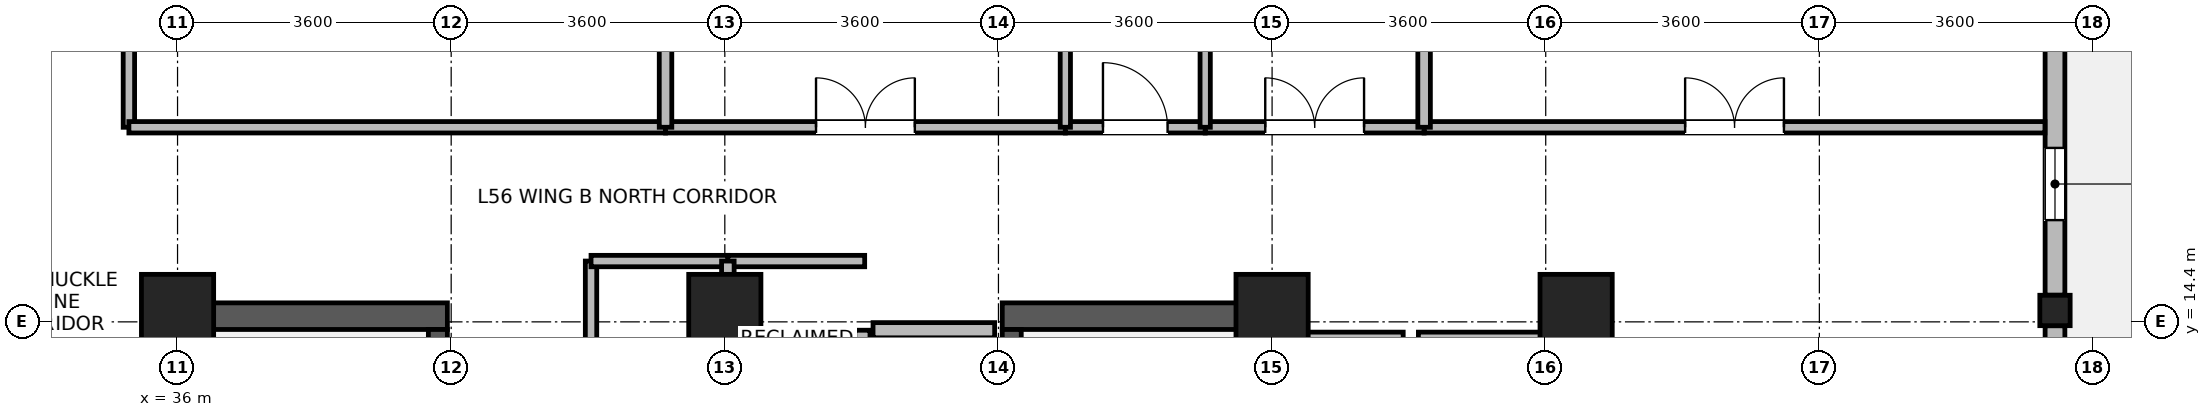
"""IFC4 building model, lengths in metres.
Left out: names, types, materials, properties, quantities, classifications, styles, units other than length and angle.
Written with IfcOpenShell. Run it as: python <this file> out.ifc"""

import sys

from ifc_helpers import new_model, si_unit, direction, frame, frame_2d, origin, origin_2d, place, context, subcontext, project, spatial, rectangle, i_section, extrude, source, transform, mapped, element, fill, save


model = new_model("IFC4")
c1 = context("Model", 3, precision=1e-05, world=origin(), true_north=direction((0.0, 1.0)))
c2 = subcontext(c1, "Body", "Model", "MODEL_VIEW")
j1 = project(units=[si_unit("LENGTHUNIT", "METRE"), si_unit("PLANEANGLEUNIT", "RADIAN")], contexts=[c1])
p1 = place(None, origin())
s1 = spatial("IfcSite", under=j1, at=p1, CompositionType="ELEMENT")
p2 = place(p1, origin())
s2 = spatial("IfcBuilding", under=s1, at=p2, CompositionType="ELEMENT")
p3 = place(p2, frame((0.0, 0.0, 220.3)))
s3 = spatial("IfcBuildingStorey", under=s2, at=p3, CompositionType="ELEMENT", Elevation=220.3)
for number, where, z_axis, x_axis in (
    (1, (36.175, 6.95, 0.0), (0.0, 0.0, 1.0), (0.0, 1.0, 0.0)),
    (2, (50.225, 6.95, 0.0), (0.0, 0.0, 1.0), (0.0, 1.0, 0.0)),
):
    element("IfcWall", number, at=place(p3, frame(where, z_axis=z_axis, x_axis=x_axis)), inside=s3, PredefinedType="SHEAR", context=c2, shape_type="SweptSolid", body=[
        extrude(rectangle(XDim=7.7, YDim=0.35, at=frame_2d((3.85, 0.0))), origin(), (0.0, 0.0, 1.0), 3.47),
    ])
for number, where, z_axis, x_axis in (
    (3, (36.35, 14.475, 0.0), (0.0, 0.0, 1.0), (1.0, 0.0, 0.0)),
    (4, (46.85, 14.475, 0.0), (0.0, 0.0, 1.0), (1.0, 0.0, 0.0)),
):
    element("IfcWall", number, at=place(p3, frame(where, z_axis=z_axis, x_axis=x_axis)), inside=s3, PredefinedType="SHEAR", context=c2, shape_type="SweptSolid", body=[
        extrude(rectangle(XDim=3.2, YDim=0.35, at=frame_2d((1.6, 0.0))), origin(), (0.0, 0.0, 1.0), 3.47),
    ])
p4 = place(p3, frame((39.425, 7.3, 0.0), z_axis=(0.0, 0.0, 1.0), x_axis=(0.0, 1.0, 0.0)))
e5 = element("IfcWall", 5, at=p4, inside=s3, PredefinedType="SHEAR", context=c2, shape_type="SweptSolid", body=[
    extrude(rectangle(XDim=7.0, YDim=0.25, at=frame_2d((3.5, 0.0))), origin(), (0.0, 0.0, 1.0), 3.47),
])
p5 = place(p4, frame((0.15, 0.0, 0.0)))
e6 = element("IfcOpeningElement", 6, at=p5, cuts=e5, PredefinedType="OPENING", context=c2, shape_type="SweptSolid", body=[
    extrude(rectangle(XDim=1.1, YDim=2.08, at=frame_2d((0.55, 1.04))), frame((0.0, 0.135, 0.0), z_axis=(0.0, -1.0, 0.0), x_axis=(1.0, 0.0, 0.0)), (0.0, 0.0, 1.0), 0.27),
])
p6 = place(p3, frame((46.975, 7.3, 0.0), z_axis=(0.0, 0.0, 1.0), x_axis=(0.0, 1.0, 0.0)))
e7 = element("IfcWall", 7, at=p6, inside=s3, PredefinedType="SHEAR", context=c2, shape_type="SweptSolid", body=[
    extrude(rectangle(XDim=7.0, YDim=0.25, at=frame_2d((3.5, 0.0))), origin(), (0.0, 0.0, 1.0), 3.47),
])
p7 = place(p6, frame((0.15, 0.0, 0.0)))
e8 = element("IfcOpeningElement", 8, at=p7, cuts=e7, PredefinedType="OPENING", context=c2, shape_type="SweptSolid", body=[
    extrude(rectangle(XDim=1.1, YDim=2.08, at=frame_2d((0.55, 1.04))), frame((0.0, 0.135, 0.0), z_axis=(0.0, -1.0, 0.0), x_axis=(1.0, 0.0, 0.0)), (0.0, 0.0, 1.0), 0.27),
])
m1 = source(origin(), c2, "Body", "SweptSolid", [
    extrude(rectangle(XDim=0.95, YDim=0.95, at=origin_2d()), origin(), (0.0, 0.0, 1.0), 3.7),
])
for number, where, z_axis, x_axis in (
    (9, (36.0, 14.55, 0.0), (0.0, 0.0, 1.0), (1.0, 0.0, 0.0)),
    (10, (43.2, 14.55, 0.0), (0.0, 0.0, 1.0), (1.0, 0.0, 0.0)),
    (11, (50.4, 14.55, 0.0), (0.0, 0.0, 1.0), (1.0, 0.0, 0.0)),
    (12, (54.4, 14.55, 0.0), (0.0, 0.0, 1.0), (1.0, 0.0, 0.0)),
):
    element("IfcColumn", number, at=place(p3, frame(where, z_axis=z_axis, x_axis=x_axis)), inside=s3, PredefinedType="COLUMN", context=c2, shape_type="MappedRepresentation", body=[
        mapped(m1, transform((0.0, 0.0, 0.0), x_axis=(1.0, 0.0, 0.0), y_axis=(0.0, 1.0, 0.0), z_axis=(0.0, 0.0, 1.0), scale=1.0)),
    ])
m2 = source(origin(), c2, "Body", "SweptSolid", [
    extrude(i_section(OverallWidth=0.399, OverallDepth=0.4, WebThickness=0.017, FlangeThickness=0.023, FilletRadius=0.015, at=origin_2d()), origin(), (0.0, 0.0, 1.0), 3.7),
])
p8 = place(p3, frame((60.7, 14.55, 0.0), z_axis=(0.0, 0.0, 1.0), x_axis=(1.0, 0.0, 0.0)))
e13 = element("IfcColumn", 13, at=p8, inside=s3, PredefinedType="COLUMN", context=c2, shape_type="MappedRepresentation", body=[
    mapped(m2, transform((0.0, 0.0, 0.0), x_axis=(1.0, 0.0, 0.0), y_axis=(0.0, 1.0, 0.0), z_axis=(0.0, 0.0, 1.0), scale=1.0)),
])
p9 = place(p3, frame((60.7, 14.349, 0.0), z_axis=(0.0, 0.0, 1.0), x_axis=(0.0, -1.0, 0.0)))
e14 = element("IfcWall", 14, at=p9, inside=s3, PredefinedType="STANDARD", context=c2, shape_type="SweptSolid", body=[
    extrude(rectangle(XDim=7.098, YDim=0.26, at=frame_2d((3.549, 0.0))), origin(), (0.0, 0.0, 1.0), 3.05),
])
p10 = place(p9, frame((2.799, 0.0, 0.0)))
e15 = element("IfcOpeningElement", 15, at=p10, cuts=e14, PredefinedType="OPENING", context=c2, shape_type="SweptSolid", body=[
    extrude(rectangle(XDim=1.5, YDim=2.15, at=frame_2d((0.75, 1.075))), frame((0.0, 0.14, 0.0), z_axis=(0.0, -1.0, 0.0), x_axis=(1.0, 0.0, 0.0)), (0.0, 0.0, 1.0), 0.28),
])
p11 = place(p3, frame((60.7, 21.399, 0.0), z_axis=(0.0, 0.0, 1.0), x_axis=(0.0, -1.0, 0.0)))
e16 = element("IfcWall", 16, at=p11, inside=s3, PredefinedType="STANDARD", context=c2, shape_type="SweptSolid", body=[
    extrude(rectangle(XDim=6.648, YDim=0.26, at=frame_2d((3.324, 0.0))), origin(), (0.0, 0.0, 1.0), 3.05),
])
p12 = place(p11, frame((0.762, 0.0, 0.85)))
e17 = element("IfcOpeningElement", 17, at=p12, cuts=e16, PredefinedType="OPENING", context=c2, shape_type="SweptSolid", body=[
    extrude(rectangle(XDim=1.8, YDim=1.85, at=frame_2d((0.9, 0.925))), frame((0.0, 0.14, 0.0), z_axis=(0.0, -1.0, 0.0), x_axis=(1.0, 0.0, 0.0)), (0.0, 0.0, 1.0), 0.28),
])
p13 = place(p11, frame((4.71, 0.0, 0.85)))
e18 = element("IfcOpeningElement", 18, at=p13, cuts=e16, PredefinedType="OPENING", context=c2, shape_type="SweptSolid", body=[
    extrude(rectangle(XDim=0.95, YDim=1.75, at=frame_2d((0.475, 0.875))), frame((0.0, 0.14, 0.0), z_axis=(0.0, -1.0, 0.0), x_axis=(1.0, 0.0, 0.0)), (0.0, 0.0, 1.0), 0.28),
])
p14 = place(p3, frame((50.475, 14.165, 0.0), z_axis=(0.0, 0.0, 1.0), x_axis=(1.0, 0.0, 0.0)))
e19 = element("IfcWall", 19, at=p14, inside=s3, PredefinedType="PARTITIONING", context=c2, shape_type="SweptSolid", body=[
    extrude(rectangle(XDim=1.65, YDim=0.2, at=frame_2d((0.825, 0.0))), origin(), (0.0, 0.0, 1.0), 3.45),
])
p15 = place(p3, frame((52.325, 14.165, 0.0), z_axis=(0.0, 0.0, 1.0), x_axis=(1.0, 0.0, 0.0)))
e20 = element("IfcWall", 20, at=p15, inside=s3, PredefinedType="PARTITIONING", context=c2, shape_type="SweptSolid", body=[
    extrude(rectangle(XDim=1.65, YDim=0.2, at=frame_2d((0.825, 0.0))), origin(), (0.0, 0.0, 1.0), 3.45),
])
p16 = place(p3, frame((45.15, 14.29, 0.0), z_axis=(0.0, 0.0, 1.0), x_axis=(1.0, 0.0, 0.0)))
e21 = element("IfcWall", 21, at=p16, inside=s3, PredefinedType="PARTITIONING", context=c2, shape_type="SweptSolid", body=[
    extrude(rectangle(XDim=1.6, YDim=0.2, at=frame_2d((0.8, 0.0))), origin(), (0.0, 0.0, 1.0), 2.55),
])
p17 = place(p3, frame((45.01, 11.61, 0.0), z_axis=(0.0, 0.0, 1.0), x_axis=(0.0, 1.0, 0.0)))
e22 = element("IfcWall", 22, at=p17, inside=s3, PredefinedType="PARTITIONING", context=c2, shape_type="SweptSolid", body=[
    extrude(rectangle(XDim=2.68, YDim=0.2, at=frame_2d((1.34, 0.0))), origin(), (0.0, 0.0, 1.0), 3.45),
])
p18 = place(p3, frame((35.36, 16.96, 0.0), z_axis=(0.0, 0.0, 1.0), x_axis=(0.0, 1.0, 0.0)))
e23 = element("IfcWall", 23, at=p18, inside=s3, PredefinedType="PARTITIONING", context=c2, shape_type="SweptSolid", body=[
    extrude(rectangle(XDim=9.8, YDim=0.15, at=frame_2d((4.9, 0.0))), origin(), (0.0, 0.0, 1.0), 3.45),
])
p19 = place(p18, frame((2.486, 0.0, 0.0)))
e24 = element("IfcOpeningElement", 24, at=p19, cuts=e23, PredefinedType="OPENING", context=c2, shape_type="SweptSolid", body=[
    extrude(rectangle(XDim=1.3, YDim=2.12, at=frame_2d((0.65, 1.06))), frame((0.0, 0.085, 0.0), z_axis=(0.0, -1.0, 0.0), x_axis=(1.0, 0.0, 0.0)), (0.0, 0.0, 1.0), 0.17),
])
p20 = place(p3, frame((52.4, 16.96, 0.0), z_axis=(0.0, 0.0, 1.0), x_axis=(1.0, 0.0, 0.0)))
e25 = element("IfcWall", 25, at=p20, inside=s3, PredefinedType="PARTITIONING", context=c2, shape_type="SweptSolid", body=[
    extrude(rectangle(XDim=8.168, YDim=0.15, at=frame_2d((4.084, 0.0))), origin(), (0.0, 0.0, 1.0), 3.45),
])
p21 = place(p20, frame((3.434, 0.0, 0.0)))
e26 = element("IfcOpeningElement", 26, at=p21, cuts=e25, PredefinedType="OPENING", context=c2, shape_type="SweptSolid", body=[
    extrude(rectangle(XDim=1.3, YDim=2.12, at=frame_2d((0.65, 1.06))), frame((0.0, 0.085, 0.0), z_axis=(0.0, -1.0, 0.0), x_axis=(1.0, 0.0, 0.0)), (0.0, 0.0, 1.0), 0.17),
])
p22 = place(p3, frame((35.36, 16.96, 0.0), z_axis=(0.0, 0.0, 1.0), x_axis=(1.0, 0.0, 0.0)))
e27 = element("IfcWall", 27, at=p22, inside=s3, PredefinedType="PARTITIONING", context=c2, shape_type="SweptSolid", body=[
    extrude(rectangle(XDim=7.06, YDim=0.15, at=frame_2d((3.53, 0.0))), origin(), (0.0, 0.0, 1.0), 3.45),
])
p23 = place(p3, frame((42.42, 16.96, 0.0), z_axis=(0.0, 0.0, 1.0), x_axis=(1.0, 0.0, 0.0)))
e28 = element("IfcWall", 28, at=p23, inside=s3, PredefinedType="PARTITIONING", context=c2, shape_type="SweptSolid", body=[
    extrude(rectangle(XDim=5.26, YDim=0.15, at=frame_2d((2.63, 0.0))), origin(), (0.0, 0.0, 1.0), 3.45),
])
p24 = place(p23, frame((1.98, 0.0, 0.0)))
e29 = element("IfcOpeningElement", 29, at=p24, cuts=e28, PredefinedType="OPENING", context=c2, shape_type="SweptSolid", body=[
    extrude(rectangle(XDim=1.3, YDim=2.12, at=frame_2d((0.65, 1.06))), frame((0.0, 0.085, 0.0), z_axis=(0.0, -1.0, 0.0), x_axis=(1.0, 0.0, 0.0)), (0.0, 0.0, 1.0), 0.17),
])
p25 = place(p3, frame((41.44, 11.64, 0.0), z_axis=(0.0, 0.0, 1.0), x_axis=(0.0, 1.0, 0.0)))
e30 = element("IfcWall", 30, at=p25, inside=s3, PredefinedType="PARTITIONING", context=c2, shape_type="SweptSolid", body=[
    extrude(rectangle(XDim=3.56, YDim=0.15, at=frame_2d((1.78, 0.0))), origin(), (0.0, 0.0, 1.0), 3.45),
])
p26 = place(p25, frame((1.13, 0.0, 0.0)))
e31 = element("IfcOpeningElement", 31, at=p26, cuts=e30, PredefinedType="OPENING", context=c2, shape_type="SweptSolid", body=[
    extrude(rectangle(XDim=1.3, YDim=2.12, at=frame_2d((0.65, 1.06))), frame((0.0, 0.085, 0.0), z_axis=(0.0, -1.0, 0.0), x_axis=(1.0, 0.0, 0.0)), (0.0, 0.0, 1.0), 0.17),
])
p27 = place(p3, frame((49.52, 16.96, 0.0), z_axis=(0.0, 0.0, 1.0), x_axis=(1.0, 0.0, 0.0)))
e32 = element("IfcWall", 32, at=p27, inside=s3, PredefinedType="PARTITIONING", context=c2, shape_type="SweptSolid", body=[
    extrude(rectangle(XDim=2.88, YDim=0.15, at=frame_2d((1.44, 0.0))), origin(), (0.0, 0.0, 1.0), 3.45),
])
p28 = place(p27, frame((0.79, 0.0, 0.0)))
e33 = element("IfcOpeningElement", 33, at=p28, cuts=e32, PredefinedType="OPENING", context=c2, shape_type="SweptSolid", body=[
    extrude(rectangle(XDim=1.3, YDim=2.12, at=frame_2d((0.65, 1.06))), frame((0.0, 0.085, 0.0), z_axis=(0.0, -1.0, 0.0), x_axis=(1.0, 0.0, 0.0)), (0.0, 0.0, 1.0), 0.17),
])
p29 = place(p3, frame((47.68, 16.96, 0.0), z_axis=(0.0, 0.0, 1.0), x_axis=(1.0, 0.0, 0.0)))
e34 = element("IfcWall", 34, at=p29, inside=s3, PredefinedType="PARTITIONING", context=c2, shape_type="SweptSolid", body=[
    extrude(rectangle(XDim=1.84, YDim=0.15, at=frame_2d((0.92, 0.0))), origin(), (0.0, 0.0, 1.0), 3.45),
])
p30 = place(p29, frame((0.495, 0.0, 0.0)))
e35 = element("IfcOpeningElement", 35, at=p30, cuts=e34, PredefinedType="OPENING", context=c2, shape_type="SweptSolid", body=[
    extrude(rectangle(XDim=0.85, YDim=2.04, at=frame_2d((0.425, 1.02))), frame((0.0, 0.085, 0.0), z_axis=(0.0, -1.0, 0.0), x_axis=(1.0, 0.0, 0.0)), (0.0, 0.0, 1.0), 0.17),
])
for number, where, z_axis, x_axis in (
    (36, (41.44, 15.2, 0.0), (0.0, 0.0, 1.0), (1.0, 0.0, 0.0)),
    (37, (43.24, 15.2, 0.0), (0.0, 0.0, 1.0), (1.0, 0.0, 0.0)),
):
    element("IfcWall", number, at=place(p3, frame(where, z_axis=z_axis, x_axis=x_axis)), inside=s3, PredefinedType="PARTITIONING", context=c2, shape_type="SweptSolid", body=[
        extrude(rectangle(XDim=1.8, YDim=0.15, at=frame_2d((0.9, 0.0))), origin(), (0.0, 0.0, 1.0), 3.45),
    ])
p31 = place(p3, frame((42.42, 16.96, 0.0), z_axis=(0.0, 0.0, 1.0), x_axis=(0.0, 1.0, 0.0)))
e38 = element("IfcWall", 38, at=p31, inside=s3, PredefinedType="PARTITIONING", context=c2, shape_type="SweptSolid", body=[
    extrude(rectangle(XDim=9.8, YDim=0.165, at=frame_2d((4.9, 0.0))), origin(), (0.0, 0.0, 1.0), 3.45),
])
for number, where, z_axis, x_axis in (
    (39, (47.68, 16.96, 0.0), (0.0, 0.0, 1.0), (0.0, 1.0, 0.0)),
    (40, (49.52, 16.96, 0.0), (0.0, 0.0, 1.0), (0.0, 1.0, 0.0)),
):
    element("IfcWall", number, at=place(p3, frame(where, z_axis=z_axis, x_axis=x_axis)), inside=s3, PredefinedType="PARTITIONING", context=c2, shape_type="SweptSolid", body=[
        extrude(rectangle(XDim=9.8, YDim=0.135, at=frame_2d((4.9, 0.0))), origin(), (0.0, 0.0, 1.0), 3.45),
    ])
p32 = place(p3, frame((52.4, 16.96, 0.0), z_axis=(0.0, 0.0, 1.0), x_axis=(0.0, 1.0, 0.0)))
e41 = element("IfcWall", 41, at=p32, inside=s3, PredefinedType="PARTITIONING", context=c2, shape_type="SweptSolid", body=[
    extrude(rectangle(XDim=9.8, YDim=0.165, at=frame_2d((4.9, 0.0))), origin(), (0.0, 0.0, 1.0), 3.45),
])
p33 = place(p3, frame((43.24, 11.64, 0.0), z_axis=(0.0, 0.0, 1.0), x_axis=(0.0, 1.0, 0.0)))
e42 = element("IfcWall", 42, at=p33, inside=s3, PredefinedType="PARTITIONING", context=c2, shape_type="SweptSolid", body=[
    extrude(rectangle(XDim=3.56, YDim=0.165, at=frame_2d((1.78, 0.0))), origin(), (0.0, 0.0, 1.0), 3.45),
])
p34 = place(p13, origin())
e43 = element("IfcWindow", 43, at=p34, inside=s3, PartitioningType="SINGLE_PANEL", PredefinedType="WINDOW", context=c2, shape_type="SweptSolid", body=[
    extrude(rectangle(XDim=0.95, YDim=1.75, at=frame_2d((0.475, 0.875))), frame((0.0, 0.03, 0.0), z_axis=(0.0, -1.0, 0.0), x_axis=(1.0, 0.0, 0.0)), (0.0, 0.0, 1.0), 0.06),
])
fill(e18, e43)
p35 = place(p21, origin())
e44 = element("IfcDoor", 44, at=p35, inside=s3, OperationType="DOUBLE_DOOR_SINGLE_SWING", PredefinedType="DOOR", context=c2, shape_type="SweptSolid", body=[
    extrude(rectangle(XDim=1.3, YDim=2.12, at=frame_2d((0.65, 1.06))), frame((0.0, 0.025, 0.0), z_axis=(0.0, -1.0, 0.0), x_axis=(1.0, 0.0, 0.0)), (0.0, 0.0, 1.0), 0.05),
])
fill(e26, e44)
p36 = place(p24, origin())
e45 = element("IfcDoor", 45, at=p36, inside=s3, OperationType="DOUBLE_DOOR_SINGLE_SWING", PredefinedType="DOOR", context=c2, shape_type="SweptSolid", body=[
    extrude(rectangle(XDim=1.3, YDim=2.12, at=frame_2d((0.65, 1.06))), frame((0.0, 0.025, 0.0), z_axis=(0.0, -1.0, 0.0), x_axis=(1.0, 0.0, 0.0)), (0.0, 0.0, 1.0), 0.05),
])
fill(e29, e45)
p37 = place(p28, origin())
e46 = element("IfcDoor", 46, at=p37, inside=s3, OperationType="DOUBLE_DOOR_SINGLE_SWING", PredefinedType="DOOR", context=c2, shape_type="SweptSolid", body=[
    extrude(rectangle(XDim=1.3, YDim=2.12, at=frame_2d((0.65, 1.06))), frame((0.0, 0.025, 0.0), z_axis=(0.0, -1.0, 0.0), x_axis=(1.0, 0.0, 0.0)), (0.0, 0.0, 1.0), 0.05),
])
fill(e33, e46)
p38 = place(p30, origin())
e47 = element("IfcDoor", 47, at=p38, inside=s3, OperationType="SINGLE_SWING_LEFT", PredefinedType="DOOR", context=c2, shape_type="SweptSolid", body=[
    extrude(rectangle(XDim=0.85, YDim=2.04, at=frame_2d((0.425, 1.02))), frame((0.0, 0.025, 0.0), z_axis=(0.0, -1.0, 0.0), x_axis=(1.0, 0.0, 0.0)), (0.0, 0.0, 1.0), 0.05),
])
fill(e35, e47)
save(model, sys.argv[1])
